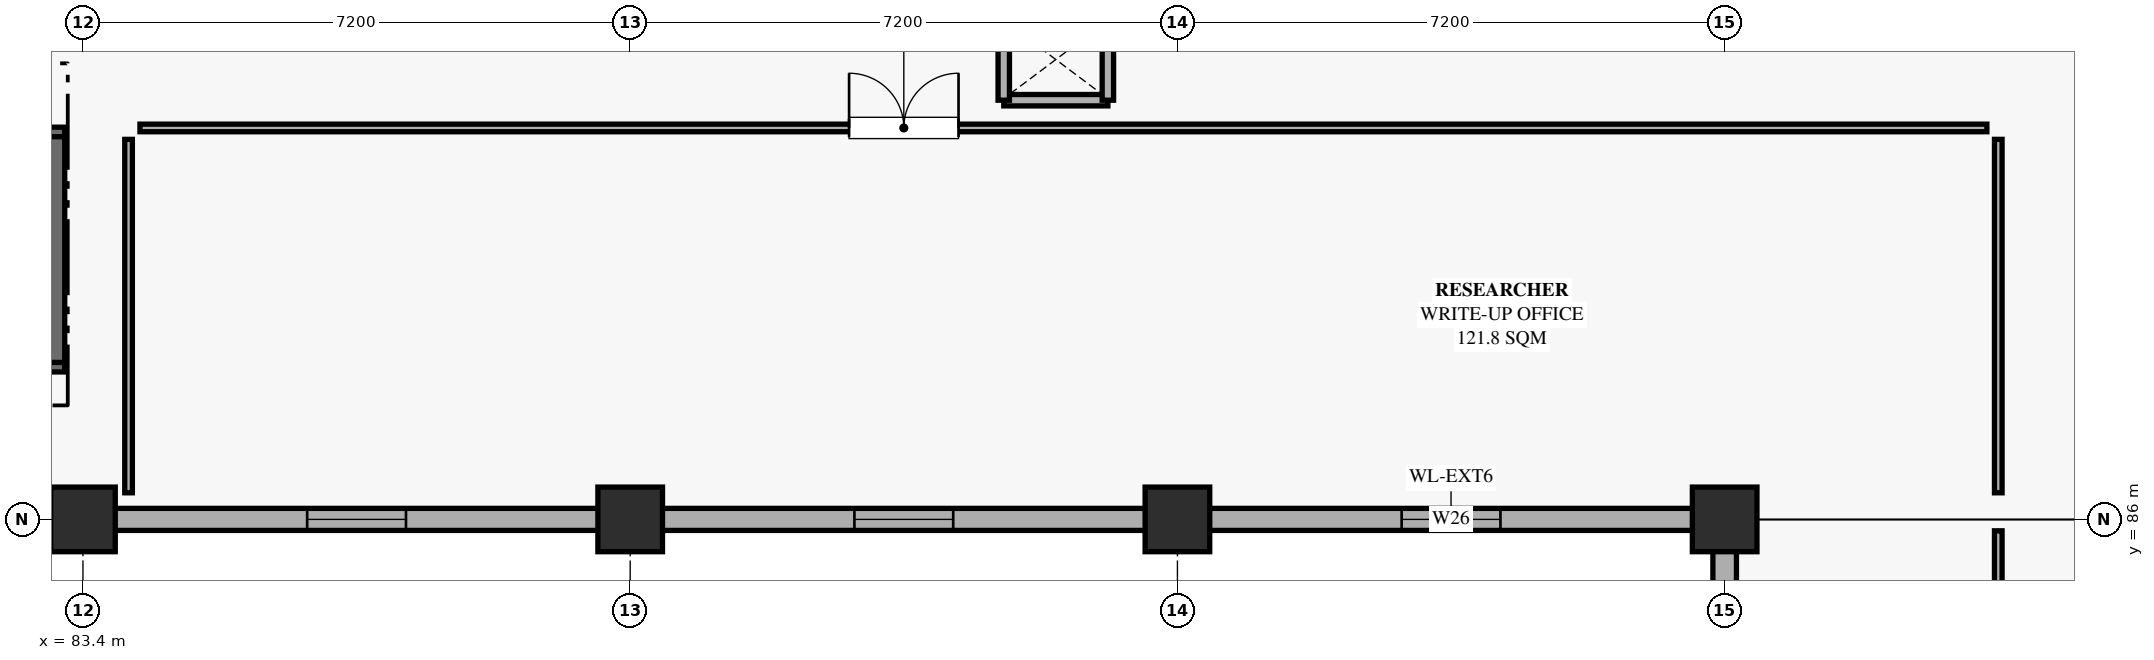
"""IFC4 building model, lengths in metres.
Left out: names, types, materials, properties, quantities, classifications, styles, units other than length and angle.
Written with IfcOpenShell. Run it as: python <this file> out.ifc"""

import sys

from ifc_helpers import new_model, si_unit, direction, frame, frame_2d, origin, origin_2d, place, context, subcontext, project, spatial, rectangle, extrude, element, fill, save


model = new_model("IFC4")
c1 = context("Model", 3, precision=1e-05, world=origin(), true_north=direction((0.0, 1.0)))
c2 = subcontext(c1, "Body", "Model", "MODEL_VIEW")
j1 = project(units=[si_unit("LENGTHUNIT", "METRE"), si_unit("PLANEANGLEUNIT", "RADIAN")], contexts=[c1])
p1 = place(None, origin())
s1 = spatial("IfcSite", under=j1, at=p1, CompositionType="ELEMENT")
p2 = place(p1, origin())
s2 = spatial("IfcBuilding", under=s1, at=p2, CompositionType="ELEMENT")
p3 = place(p2, frame((0.0, 0.0, 10.44)))
s3 = spatial("IfcBuildingStorey", under=s2, at=p3, CompositionType="ELEMENT", Elevation=10.44)
for number, where, z_axis, x_axis in (
    (1, (83.4, 86.0, 0.0), (0.0, 0.0, 1.0), (1.0, 0.0, 0.0)),
    (2, (90.6, 86.0, 0.0), (0.0, 0.0, 1.0), (1.0, 0.0, 0.0)),
    (3, (97.8, 86.0, 0.0), (0.0, 0.0, 1.0), (1.0, 0.0, 0.0)),
    (4, (105.0, 86.0, 0.0), (0.0, 0.0, 1.0), (1.0, 0.0, 0.0)),
):
    element("IfcColumn", number, at=place(p3, frame(where, z_axis=z_axis, x_axis=x_axis)), inside=s3, PredefinedType="COLUMN", context=c2, shape_type="SweptSolid", body=[
        extrude(rectangle(XDim=0.85, YDim=0.85, at=origin_2d()), origin(), (0.0, 0.0, 1.0), 4.68),
    ])
p4 = place(p3, frame((105.0, 79.21, 0.0), z_axis=(0.0, 0.0, 1.0), x_axis=(0.0, 1.0, 0.0)))
e5 = element("IfcWall", 5, at=p4, inside=s3, PredefinedType="SOLIDWALL", context=c2, shape_type="SweptSolid", body=[
    extrude(rectangle(XDim=6.38, YDim=0.31, at=frame_2d((3.19, 0.0))), origin(), (0.0, 0.0, 1.0), 3.18),
])
p5 = place(p4, frame((2.24, 0.0, 0.85)))
e6 = element("IfcOpeningElement", 6, at=p5, cuts=e5, PredefinedType="OPENING", context=c2, shape_type="SweptSolid", body=[
    extrude(rectangle(XDim=1.9, YDim=2.0, at=frame_2d((0.95, 1.0))), frame((0.0, 0.165, 0.0), z_axis=(0.0, -1.0, 0.0), x_axis=(1.0, 0.0, 0.0)), (0.0, 0.0, 1.0), 0.33),
])
p6 = place(p3, frame((104.59, 86.0, 0.0), z_axis=(0.0, 0.0, 1.0), x_axis=(-1.0, 0.0, 0.0)))
e7 = element("IfcWall", 7, at=p6, inside=s3, PredefinedType="SOLIDWALL", context=c2, shape_type="SweptSolid", body=[
    extrude(rectangle(XDim=6.38, YDim=0.29, at=frame_2d((3.19, 0.0))), origin(), (0.0, 0.0, 1.0), 3.18),
])
p7 = place(p6, frame((2.54, 0.0, 0.85)))
e8 = element("IfcOpeningElement", 8, at=p7, cuts=e7, PredefinedType="OPENING", context=c2, shape_type="SweptSolid", body=[
    extrude(rectangle(XDim=1.3, YDim=1.9, at=frame_2d((0.65, 0.95))), frame((0.0, 0.155, 0.0), z_axis=(0.0, -1.0, 0.0), x_axis=(1.0, 0.0, 0.0)), (0.0, 0.0, 1.0), 0.31),
])
p8 = place(p3, frame((97.39, 86.0, 0.0), z_axis=(0.0, 0.0, 1.0), x_axis=(-1.0, 0.0, 0.0)))
e9 = element("IfcWall", 9, at=p8, inside=s3, PredefinedType="SOLIDWALL", context=c2, shape_type="SweptSolid", body=[
    extrude(rectangle(XDim=6.38, YDim=0.29, at=frame_2d((3.19, 0.0))), origin(), (0.0, 0.0, 1.0), 3.18),
])
p9 = place(p8, frame((2.54, 0.0, 0.85)))
e10 = element("IfcOpeningElement", 10, at=p9, cuts=e9, PredefinedType="OPENING", context=c2, shape_type="SweptSolid", body=[
    extrude(rectangle(XDim=1.3, YDim=1.9, at=frame_2d((0.65, 0.95))), frame((0.0, 0.155, 0.0), z_axis=(0.0, -1.0, 0.0), x_axis=(1.0, 0.0, 0.0)), (0.0, 0.0, 1.0), 0.31),
])
p10 = place(p3, frame((90.19, 86.0, 0.0), z_axis=(0.0, 0.0, 1.0), x_axis=(-1.0, 0.0, 0.0)))
e11 = element("IfcWall", 11, at=p10, inside=s3, PredefinedType="SOLIDWALL", context=c2, shape_type="SweptSolid", body=[
    extrude(rectangle(XDim=6.38, YDim=0.29, at=frame_2d((3.19, 0.0))), origin(), (0.0, 0.0, 1.0), 3.18),
])
p11 = place(p10, frame((2.54, 0.0, 0.85)))
e12 = element("IfcOpeningElement", 12, at=p11, cuts=e11, PredefinedType="OPENING", context=c2, shape_type="SweptSolid", body=[
    extrude(rectangle(XDim=1.3, YDim=1.9, at=frame_2d((0.65, 0.95))), frame((0.0, 0.155, 0.0), z_axis=(0.0, -1.0, 0.0), x_axis=(1.0, 0.0, 0.0)), (0.0, 0.0, 1.0), 0.31),
])
p12 = place(p3, frame((96.885, 91.515, 0.0), z_axis=(0.0, 0.0, 1.0), x_axis=(-1.0, 0.0, 0.0)))
e13 = element("IfcWall", 13, at=p12, inside=s3, PredefinedType="PARTITIONING", context=c2, shape_type="SweptSolid", body=[
    extrude(rectangle(XDim=1.37, YDim=0.15, at=frame_2d((0.685, 0.0))), origin(), (0.0, 0.0, 1.0), 3.16),
])
for number, where, z_axis, x_axis in (
    (14, (95.515, 91.515, 0.0), (0.0, 0.0, 1.0), (0.0, 1.0, 0.0)),
    (15, (96.885, 92.585, 0.0), (0.0, 0.0, 1.0), (0.0, -1.0, 0.0)),
):
    element("IfcWall", number, at=place(p3, frame(where, z_axis=z_axis, x_axis=x_axis)), inside=s3, PredefinedType="PARTITIONING", context=c2, shape_type="SweptSolid", body=[
        extrude(rectangle(XDim=1.07, YDim=0.15, at=frame_2d((0.535, 0.0))), origin(), (0.0, 0.0, 1.0), 3.16),
    ])
p13 = place(p3, frame((83.16, 88.065, 0.0), z_axis=(0.0, 0.0, 1.0), x_axis=(-1.0, 0.0, 0.0)))
e16 = element("IfcWall", 16, at=p13, inside=s3, PredefinedType="SHEAR", context=c2, shape_type="SweptSolid", body=[
    extrude(rectangle(XDim=2.62, YDim=0.25, at=frame_2d((1.31, 0.0))), origin(), (0.0, 0.0, 1.0), 4.41),
])
p14 = place(p3, frame((80.54, 91.035, 0.0), z_axis=(0.0, 0.0, 1.0), x_axis=(1.0, 0.0, 0.0)))
e17 = element("IfcWall", 17, at=p14, inside=s3, PredefinedType="SHEAR", context=c2, shape_type="SweptSolid", body=[
    extrude(rectangle(XDim=2.62, YDim=0.25, at=frame_2d((1.31, 0.0))), origin(), (0.0, 0.0, 1.0), 4.41),
])
p15 = place(p14, frame((0.76, 0.0, 0.0)))
e18 = element("IfcOpeningElement", 18, at=p15, cuts=e17, PredefinedType="OPENING", context=c2, shape_type="SweptSolid", body=[
    extrude(rectangle(XDim=1.1, YDim=2.2, at=frame_2d((0.55, 1.1))), frame((0.0, 0.135, 0.0), z_axis=(0.0, -1.0, 0.0), x_axis=(1.0, 0.0, 0.0)), (0.0, 0.0, 1.0), 0.27),
])
p16 = place(p3, frame((83.035, 91.035, 0.0), z_axis=(0.0, 0.0, 1.0), x_axis=(0.0, -1.0, 0.0)))
e19 = element("IfcWall", 19, at=p16, inside=s3, PredefinedType="SHEAR", context=c2, shape_type="SweptSolid", body=[
    extrude(rectangle(XDim=2.97, YDim=0.25, at=frame_2d((1.485, 0.0))), origin(), (0.0, 0.0, 1.0), 4.41),
])
p17 = place(p3, frame((108.6, 85.85, 0.0), z_axis=(0.0, 0.0, 1.0), x_axis=(0.0, -1.0, 0.0)))
e20 = element("IfcWall", 20, at=p17, inside=s3, PredefinedType="PARTITIONING", context=c2, shape_type="SweptSolid", body=[
    extrude(rectangle(XDim=21.3, YDim=0.1, at=frame_2d((10.65, 0.0))), origin(), (0.0, 0.0, 1.0), 3.16),
])
p18 = place(p17, frame((9.96, 0.0, 0.0)))
e21 = element("IfcOpeningElement", 21, at=p18, cuts=e20, PredefinedType="OPENING", context=c2, shape_type="SweptSolid", body=[
    extrude(rectangle(XDim=1.38, YDim=2.16, at=frame_2d((0.69, 1.08))), frame((0.0, 0.06, 0.0), z_axis=(0.0, -1.0, 0.0), x_axis=(1.0, 0.0, 0.0)), (0.0, 0.0, 1.0), 0.12),
])
p19 = place(p3, frame((84.15, 91.15, 0.0), z_axis=(0.0, 0.0, 1.0), x_axis=(1.0, 0.0, 0.0)))
e22 = element("IfcWall", 22, at=p19, inside=s3, PredefinedType="PARTITIONING", context=c2, shape_type="SweptSolid", body=[
    extrude(rectangle(XDim=24.3, YDim=0.1, at=frame_2d((12.15, 0.0))), origin(), (0.0, 0.0, 1.0), 3.16),
])
p20 = place(p19, frame((9.33, 0.0, 0.0)))
e23 = element("IfcOpeningElement", 23, at=p20, cuts=e22, PredefinedType="OPENING", context=c2, shape_type="SweptSolid", body=[
    extrude(rectangle(XDim=1.44, YDim=2.1, at=frame_2d((0.72, 1.05))), frame((0.0, 0.06, 0.0), z_axis=(0.0, -1.0, 0.0), x_axis=(1.0, 0.0, 0.0)), (0.0, 0.0, 1.0), 0.12),
])
for number, where, z_axis, x_axis in (
    (24, (84.0, 86.35, 0.0), (0.0, 0.0, 1.0), (0.0, 1.0, 0.0)),
    (25, (108.6, 91.0, 0.0), (0.0, 0.0, 1.0), (0.0, -1.0, 0.0)),
):
    element("IfcWall", number, at=place(p3, frame(where, z_axis=z_axis, x_axis=x_axis)), inside=s3, PredefinedType="PARTITIONING", context=c2, shape_type="SweptSolid", body=[
        extrude(rectangle(XDim=4.65, YDim=0.1, at=frame_2d((2.325, 0.0))), origin(), (0.0, 0.0, 1.0), 3.16),
    ])
p21 = place(p7, origin())
e26 = element("IfcWindow", 26, at=p21, inside=s3, PartitioningType="SINGLE_PANEL", PredefinedType="WINDOW", context=c2, shape_type="SweptSolid", body=[
    extrude(rectangle(XDim=1.3, YDim=1.9, at=frame_2d((0.65, 0.95))), frame((0.0, 0.03, 0.0), z_axis=(0.0, -1.0, 0.0), x_axis=(1.0, 0.0, 0.0)), (0.0, 0.0, 1.0), 0.06),
])
fill(e8, e26)
p22 = place(p9, origin())
e27 = element("IfcWindow", 27, at=p22, inside=s3, PartitioningType="SINGLE_PANEL", PredefinedType="WINDOW", context=c2, shape_type="SweptSolid", body=[
    extrude(rectangle(XDim=1.3, YDim=1.9, at=frame_2d((0.65, 0.95))), frame((0.0, 0.03, 0.0), z_axis=(0.0, -1.0, 0.0), x_axis=(1.0, 0.0, 0.0)), (0.0, 0.0, 1.0), 0.06),
])
fill(e10, e27)
p23 = place(p11, origin())
e28 = element("IfcWindow", 28, at=p23, inside=s3, PartitioningType="SINGLE_PANEL", PredefinedType="WINDOW", context=c2, shape_type="SweptSolid", body=[
    extrude(rectangle(XDim=1.3, YDim=1.9, at=frame_2d((0.65, 0.95))), frame((0.0, 0.03, 0.0), z_axis=(0.0, -1.0, 0.0), x_axis=(1.0, 0.0, 0.0)), (0.0, 0.0, 1.0), 0.06),
])
fill(e12, e28)
p24 = place(p20, origin())
e29 = element("IfcDoor", 29, at=p24, inside=s3, OperationType="DOUBLE_DOOR_SINGLE_SWING", PredefinedType="DOOR", context=c2, shape_type="SweptSolid", body=[
    extrude(rectangle(XDim=1.44, YDim=2.1, at=frame_2d((0.72, 1.05))), frame((0.0, 0.025, 0.0), z_axis=(0.0, -1.0, 0.0), x_axis=(1.0, 0.0, 0.0)), (0.0, 0.0, 1.0), 0.05),
])
fill(e23, e29)
save(model, sys.argv[1])
